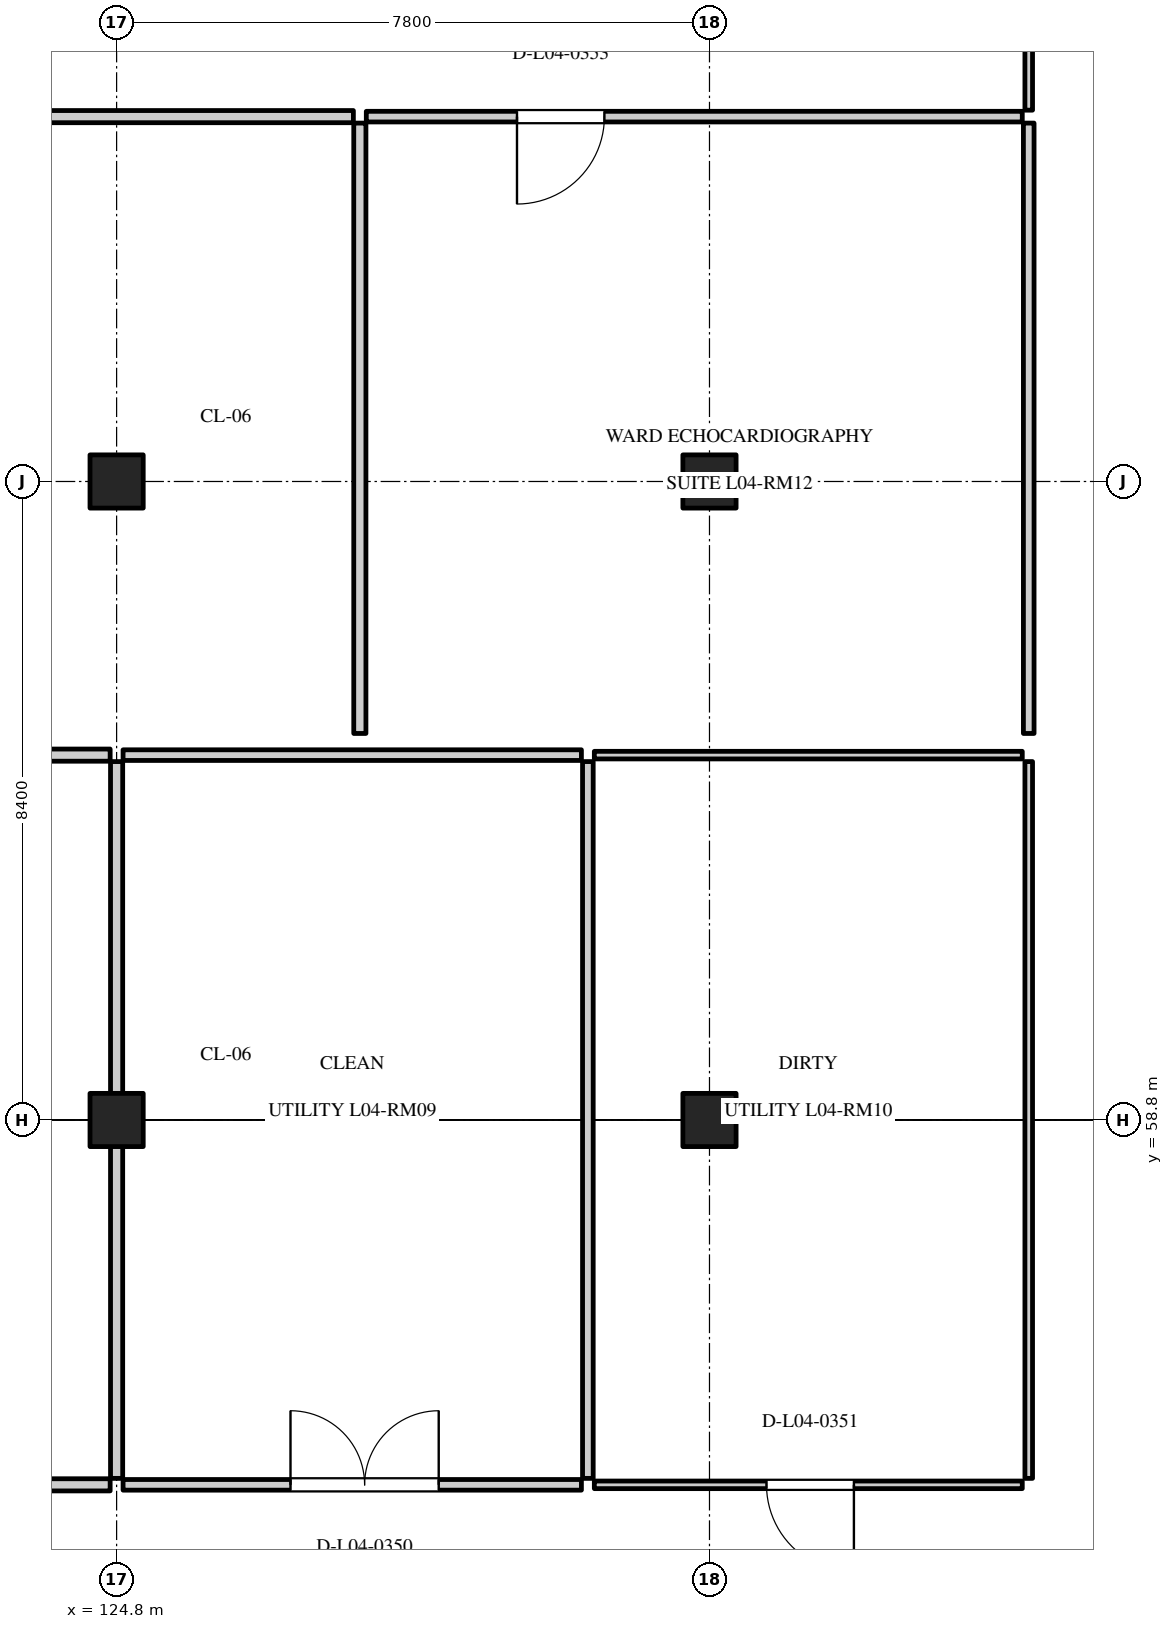
"""IFC4 building model, lengths in metres.
Left out: names, types, materials, properties, quantities, classifications, styles, units other than length and angle.
Written with IfcOpenShell. Run it as: python <this file> out.ifc"""

import sys

from ifc_helpers import new_model, si_unit, direction, frame, frame_2d, origin, origin_2d, place, context, subcontext, project, spatial, rectangle, extrude, element, fill, save


model = new_model("IFC4")
c1 = context("Model", 3, precision=1e-05, world=origin(), true_north=direction((0.0, 1.0)))
c2 = subcontext(c1, "Body", "Model", "MODEL_VIEW")
j1 = project(units=[si_unit("LENGTHUNIT", "METRE"), si_unit("PLANEANGLEUNIT", "RADIAN")], contexts=[c1])
p1 = place(None, origin())
s1 = spatial("IfcSite", under=j1, at=p1, CompositionType="ELEMENT")
p2 = place(p1, origin())
s2 = spatial("IfcBuilding", under=s1, at=p2, CompositionType="ELEMENT")
p3 = place(p2, frame((0.0, 0.0, 18.0)))
s3 = spatial("IfcBuildingStorey", under=s2, at=p3, CompositionType="ELEMENT", Elevation=18.0)
for number, where, z_axis, x_axis in (
    (1, (124.8, 58.8, 0.0), (0.0, 0.0, 1.0), (1.0, 0.0, 0.0)),
    (2, (124.8, 67.2, 0.0), (0.0, 0.0, 1.0), (1.0, 0.0, 0.0)),
    (3, (132.6, 58.8, 0.0), (0.0, 0.0, 1.0), (1.0, 0.0, 0.0)),
    (4, (132.6, 67.2, 0.0), (0.0, 0.0, 1.0), (1.0, 0.0, 0.0)),
):
    element("IfcColumn", number, at=place(p3, frame(where, z_axis=z_axis, x_axis=x_axis)), inside=s3, PredefinedType="COLUMN", context=c2, shape_type="SweptSolid", body=[
        extrude(rectangle(XDim=0.7, YDim=0.7, at=origin_2d()), origin(), (0.0, 0.0, 1.0), 4.2),
    ])
p4 = place(p3, frame((113.285, 54.0, 0.0), z_axis=(0.0, 0.0, 1.0), x_axis=(1.0, 0.0, 0.0)))
e5 = element("IfcWall", 5, at=p4, inside=s3, PredefinedType="PARTITIONING", context=c2, shape_type="SweptSolid", body=[
    extrude(rectangle(XDim=11.43, YDim=0.16, at=frame_2d((5.715, 0.0))), origin(), (0.0, 0.0, 1.0), 3.865),
])
p5 = place(p4, frame((1.996, 0.0, 0.0)))
e6 = element("IfcOpeningElement", 6, at=p5, cuts=e5, PredefinedType="OPENING", context=c2, shape_type="SweptSolid", body=[
    extrude(rectangle(XDim=1.85, YDim=2.3, at=frame_2d((0.925, 1.15))), frame((0.0, 0.092, 0.0), z_axis=(0.0, -1.0, 0.0), x_axis=(1.0, 0.0, 0.0)), (0.0, 0.0, 1.0), 0.184),
])
p6 = place(p3, frame((113.285, 63.6, 0.0), z_axis=(0.0, 0.0, 1.0), x_axis=(1.0, 0.0, 0.0)))
e7 = element("IfcWall", 7, at=p6, inside=s3, PredefinedType="PARTITIONING", context=c2, shape_type="SweptSolid", body=[
    extrude(rectangle(XDim=11.43, YDim=0.16, at=frame_2d((5.715, 0.0))), origin(), (0.0, 0.0, 1.0), 3.865),
])
p7 = place(p3, frame((124.8, 54.085, 0.0), z_axis=(0.0, 0.0, 1.0), x_axis=(0.0, 1.0, 0.0)))
e8 = element("IfcWall", 8, at=p7, inside=s3, PredefinedType="PARTITIONING", context=c2, shape_type="SweptSolid", body=[
    extrude(rectangle(XDim=9.43, YDim=0.16, at=frame_2d((4.715, 0.0))), origin(), (0.0, 0.0, 1.0), 3.865),
])
p8 = place(p3, frame((124.885, 54.0, 0.0), z_axis=(0.0, 0.0, 1.0), x_axis=(1.0, 0.0, 0.0)))
e9 = element("IfcWall", 9, at=p8, inside=s3, PredefinedType="PARTITIONING", context=c2, shape_type="SweptSolid", body=[
    extrude(rectangle(XDim=6.03, YDim=0.14, at=frame_2d((3.015, 0.0))), origin(), (0.0, 0.0, 1.0), 3.865),
])
p9 = place(p8, frame((2.203, 0.0, 0.0)))
e10 = element("IfcOpeningElement", 10, at=p9, cuts=e9, PredefinedType="OPENING", context=c2, shape_type="SweptSolid", body=[
    extrude(rectangle(XDim=1.95, YDim=2.35, at=frame_2d((0.975, 1.175))), frame((0.0, 0.082, 0.0), z_axis=(0.0, -1.0, 0.0), x_axis=(1.0, 0.0, 0.0)), (0.0, 0.0, 1.0), 0.164),
])
p10 = place(p3, frame((124.885, 63.6, 0.0), z_axis=(0.0, 0.0, 1.0), x_axis=(1.0, 0.0, 0.0)))
e11 = element("IfcWall", 11, at=p10, inside=s3, PredefinedType="PARTITIONING", context=c2, shape_type="SweptSolid", body=[
    extrude(rectangle(XDim=6.03, YDim=0.14, at=frame_2d((3.015, 0.0))), origin(), (0.0, 0.0, 1.0), 3.865),
])
p11 = place(p3, frame((131.0, 54.085, 0.0), z_axis=(0.0, 0.0, 1.0), x_axis=(0.0, 1.0, 0.0)))
e12 = element("IfcWall", 12, at=p11, inside=s3, PredefinedType="PARTITIONING", context=c2, shape_type="SweptSolid", body=[
    extrude(rectangle(XDim=9.43, YDim=0.14, at=frame_2d((4.715, 0.0))), origin(), (0.0, 0.0, 1.0), 3.865),
])
p12 = place(p3, frame((131.085, 54.0, 0.0), z_axis=(0.0, 0.0, 1.0), x_axis=(1.0, 0.0, 0.0)))
e13 = element("IfcWall", 13, at=p12, inside=s3, PredefinedType="PARTITIONING", context=c2, shape_type="SweptSolid", body=[
    extrude(rectangle(XDim=5.63, YDim=0.1, at=frame_2d((2.815, 0.0))), origin(), (0.0, 0.0, 1.0), 3.865),
])
p13 = place(p12, frame((2.265, 0.0, 0.0)))
e14 = element("IfcOpeningElement", 14, at=p13, cuts=e13, PredefinedType="OPENING", context=c2, shape_type="SweptSolid", body=[
    extrude(rectangle(XDim=1.15, YDim=2.15, at=frame_2d((0.575, 1.075))), frame((0.0, 0.062, 0.0), z_axis=(0.0, -1.0, 0.0), x_axis=(1.0, 0.0, 0.0)), (0.0, 0.0, 1.0), 0.124),
])
p14 = place(p3, frame((131.085, 63.6, 0.0), z_axis=(0.0, 0.0, 1.0), x_axis=(1.0, 0.0, 0.0)))
e15 = element("IfcWall", 15, at=p14, inside=s3, PredefinedType="PARTITIONING", context=c2, shape_type="SweptSolid", body=[
    extrude(rectangle(XDim=5.63, YDim=0.1, at=frame_2d((2.815, 0.0))), origin(), (0.0, 0.0, 1.0), 3.865),
])
p15 = place(p3, frame((136.8, 54.085, 0.0), z_axis=(0.0, 0.0, 1.0), x_axis=(0.0, 1.0, 0.0)))
e16 = element("IfcWall", 16, at=p15, inside=s3, PredefinedType="PARTITIONING", context=c2, shape_type="SweptSolid", body=[
    extrude(rectangle(XDim=9.43, YDim=0.1, at=frame_2d((4.715, 0.0))), origin(), (0.0, 0.0, 1.0), 3.865),
])
p16 = place(p3, frame((113.285, 72.0, 0.0), z_axis=(0.0, 0.0, 1.0), x_axis=(1.0, 0.0, 0.0)))
e17 = element("IfcWall", 17, at=p16, inside=s3, PredefinedType="PARTITIONING", context=c2, shape_type="SweptSolid", body=[
    extrude(rectangle(XDim=14.63, YDim=0.16, at=frame_2d((7.315, 0.0))), origin(), (0.0, 0.0, 1.0), 3.865),
])
p17 = place(p16, frame((1.958, 0.0, 0.0)))
e18 = element("IfcOpeningElement", 18, at=p17, cuts=e17, PredefinedType="OPENING", context=c2, shape_type="SweptSolid", body=[
    extrude(rectangle(XDim=1.15, YDim=2.15, at=frame_2d((0.575, 1.075))), frame((0.0, 0.092, 0.0), z_axis=(0.0, -1.0, 0.0), x_axis=(1.0, 0.0, 0.0)), (0.0, 0.0, 1.0), 0.184),
])
p18 = place(p3, frame((128.0, 63.885, 0.0), z_axis=(0.0, 0.0, 1.0), x_axis=(0.0, 1.0, 0.0)))
e19 = element("IfcWall", 19, at=p18, inside=s3, PredefinedType="PARTITIONING", context=c2, shape_type="SweptSolid", body=[
    extrude(rectangle(XDim=8.03, YDim=0.16, at=frame_2d((4.015, 0.0))), origin(), (0.0, 0.0, 1.0), 3.865),
])
p19 = place(p3, frame((128.085, 72.0, 0.0), z_axis=(0.0, 0.0, 1.0), x_axis=(1.0, 0.0, 0.0)))
e20 = element("IfcWall", 20, at=p19, inside=s3, PredefinedType="PARTITIONING", context=c2, shape_type="SweptSolid", body=[
    extrude(rectangle(XDim=8.63, YDim=0.14, at=frame_2d((4.315, 0.0))), origin(), (0.0, 0.0, 1.0), 3.865),
])
p20 = place(p19, frame((1.982, 0.0, 0.0)))
e21 = element("IfcOpeningElement", 21, at=p20, cuts=e20, PredefinedType="OPENING", context=c2, shape_type="SweptSolid", body=[
    extrude(rectangle(XDim=1.15, YDim=2.15, at=frame_2d((0.575, 1.075))), frame((0.0, 0.082, 0.0), z_axis=(0.0, -1.0, 0.0), x_axis=(1.0, 0.0, 0.0)), (0.0, 0.0, 1.0), 0.164),
])
p21 = place(p3, frame((136.8, 63.885, 0.0), z_axis=(0.0, 0.0, 1.0), x_axis=(0.0, 1.0, 0.0)))
e22 = element("IfcWall", 22, at=p21, inside=s3, PredefinedType="PARTITIONING", context=c2, shape_type="SweptSolid", body=[
    extrude(rectangle(XDim=8.03, YDim=0.14, at=frame_2d((4.015, 0.0))), origin(), (0.0, 0.0, 1.0), 3.865),
])
p22 = place(p3, frame((136.8, 72.085, 0.0), z_axis=(0.0, 0.0, 1.0), x_axis=(0.0, 1.0, 0.0)))
e23 = element("IfcWall", 23, at=p22, inside=s3, PredefinedType="PARTITIONING", context=c2, shape_type="SweptSolid", body=[
    extrude(rectangle(XDim=3.23, YDim=0.1, at=frame_2d((1.615, 0.0))), origin(), (0.0, 0.0, 1.0), 3.865),
])
p23 = place(p9, origin())
e24 = element("IfcDoor", 24, at=p23, inside=s3, OperationType="DOUBLE_DOOR_SINGLE_SWING", PredefinedType="DOOR", context=c2, shape_type="SweptSolid", body=[
    extrude(rectangle(XDim=1.95, YDim=2.35, at=frame_2d((0.975, 1.175))), frame((0.0, 0.025, 0.0), z_axis=(0.0, -1.0, 0.0), x_axis=(1.0, 0.0, 0.0)), (0.0, 0.0, 1.0), 0.05),
])
fill(e10, e24)
p24 = place(p13, origin())
e25 = element("IfcDoor", 25, at=p24, inside=s3, OperationType="SINGLE_SWING_RIGHT", PredefinedType="DOOR", context=c2, shape_type="SweptSolid", body=[
    extrude(rectangle(XDim=1.15, YDim=2.15, at=frame_2d((0.575, 1.075))), frame((0.0, 0.025, 0.0), z_axis=(0.0, -1.0, 0.0), x_axis=(1.0, 0.0, 0.0)), (0.0, 0.0, 1.0), 0.05),
])
fill(e14, e25)
p25 = place(p20, frame((1.15, 0.0, 0.0), z_axis=(0.0, 0.0, 1.0), x_axis=(-1.0, 0.0, 0.0)))
e26 = element("IfcDoor", 26, at=p25, inside=s3, OperationType="SINGLE_SWING_RIGHT", PredefinedType="DOOR", context=c2, shape_type="SweptSolid", body=[
    extrude(rectangle(XDim=1.15, YDim=2.15, at=frame_2d((0.575, 1.075))), frame((0.0, 0.025, 0.0), z_axis=(0.0, -1.0, 0.0), x_axis=(1.0, 0.0, 0.0)), (0.0, 0.0, 1.0), 0.05),
])
fill(e21, e26)
save(model, sys.argv[1])
